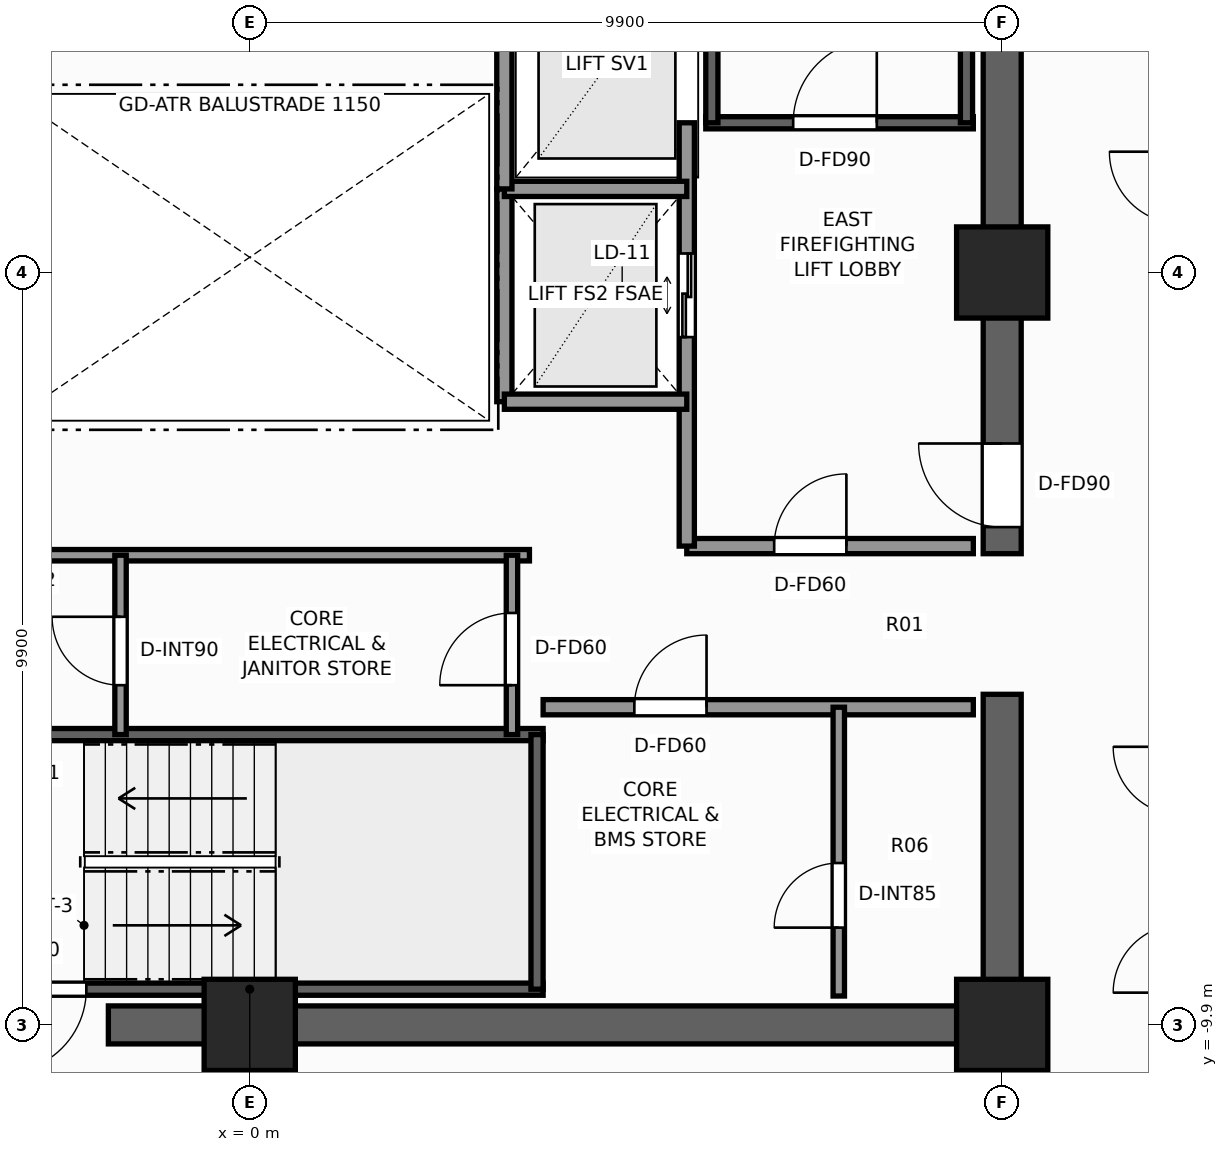
"""IFC4 building model, lengths in metres.
Left out: names, types, materials, properties, quantities, classifications, styles, units other than length and angle.
Written with IfcOpenShell. Run it as: python <this file> out.ifc"""

import sys

from ifc_helpers import new_model, si_unit, direction, frame, frame_2d, origin, origin_2d, place, context, subcontext, project, spatial, rectangle, extrude, element, fill, save


model = new_model("IFC4")
c1 = context("Model", 3, precision=1e-05, world=origin(), true_north=direction((0.0, 1.0)))
c2 = subcontext(c1, "Body", "Model", "MODEL_VIEW")
j1 = project(units=[si_unit("LENGTHUNIT", "METRE"), si_unit("PLANEANGLEUNIT", "RADIAN")], contexts=[c1])
p1 = place(None, origin())
s1 = spatial("IfcSite", under=j1, at=p1, CompositionType="ELEMENT")
p2 = place(p1, origin())
s2 = spatial("IfcBuilding", under=s1, at=p2, CompositionType="ELEMENT")
p3 = place(p2, frame((0.0, 0.0, 115.1)))
s3 = spatial("IfcBuildingStorey", under=s2, at=p3, CompositionType="ELEMENT", Elevation=115.1)
p4 = place(p3, frame((10.15, -9.9, 0.0), z_axis=(0.0, 0.0, 1.0), x_axis=(-1.0, 0.0, 0.0)))
e1 = element("IfcWall", 1, at=p4, inside=s3, PredefinedType="SHEAR", context=c2, shape_type="SweptSolid", body=[
    extrude(rectangle(XDim=12.01, YDim=0.5, at=frame_2d((6.005, 0.0))), origin(), (0.0, 0.0, 1.0), 3.3),
])
p5 = place(p3, frame((9.9, -9.65, 0.0), z_axis=(0.0, 0.0, 1.0), x_axis=(0.0, 1.0, 0.0)))
e2 = element("IfcWall", 2, at=p5, inside=s3, PredefinedType="SHEAR", context=c2, shape_type="SweptSolid", body=[
    extrude(rectangle(XDim=4.1, YDim=0.5, at=frame_2d((2.05, 0.0))), origin(), (0.0, 0.0, 1.0), 3.3),
])
p6 = place(p3, frame((9.9, -3.7, 0.0), z_axis=(0.0, 0.0, 1.0), x_axis=(0.0, 1.0, 0.0)))
e3 = element("IfcWall", 3, at=p6, inside=s3, PredefinedType="SHEAR", context=c2, shape_type="SweptSolid", body=[
    extrude(rectangle(XDim=13.35, YDim=0.5, at=frame_2d((6.675, 0.0))), origin(), (0.0, 0.0, 1.0), 3.3),
])
p7 = place(p6, frame((0.35, 0.0, 0.0)))
e4 = element("IfcOpeningElement", 4, at=p7, cuts=e3, PredefinedType="OPENING", context=c2, shape_type="SweptSolid", body=[
    extrude(rectangle(XDim=1.1, YDim=2.2, at=frame_2d((0.55, 1.1))), frame((0.0, 0.26, 0.0), z_axis=(0.0, -1.0, 0.0), x_axis=(1.0, 0.0, 0.0)), (0.0, 0.0, 1.0), 0.52),
])
for number, where, z_axis, x_axis in (
    (5, (9.9, -9.9, 0.0), (0.0, 0.0, 1.0), (1.0, 0.0, 0.0)),
    (6, (0.0, -9.9, 0.0), (0.0, 0.0, 1.0), (1.0, 0.0, 0.0)),
    (7, (9.9, 0.0, 0.0), (0.0, 0.0, 1.0), (1.0, 0.0, 0.0)),
):
    element("IfcColumn", number, at=place(p3, frame(where, z_axis=z_axis, x_axis=x_axis)), inside=s3, PredefinedType="COLUMN", context=c2, shape_type="SweptSolid", body=[
        extrude(rectangle(XDim=1.2, YDim=1.2, at=origin_2d()), origin(), (0.0, 0.0, 1.0), 3.3),
    ])
p8 = place(p3, frame((6.0, 1.97, 0.0), z_axis=(0.0, 0.0, 1.0), x_axis=(1.0, 0.0, 0.0)))
e8 = element("IfcWall", 8, at=p8, inside=s3, PredefinedType="SHEAR", context=c2, shape_type="SweptSolid", body=[
    extrude(rectangle(XDim=3.52, YDim=0.16, at=frame_2d((1.76, 0.0))), origin(), (0.0, 0.0, 1.0), 3.3),
])
p9 = place(p8, frame((1.15, 0.0, 0.0)))
e9 = element("IfcOpeningElement", 9, at=p9, cuts=e8, PredefinedType="OPENING", context=c2, shape_type="SweptSolid", body=[
    extrude(rectangle(XDim=1.1, YDim=2.2, at=frame_2d((0.55, 1.1))), frame((0.0, 0.09, 0.0), z_axis=(0.0, -1.0, 0.0), x_axis=(1.0, 0.0, 0.0)), (0.0, 0.0, 1.0), 0.18),
])
for number, where, z_axis, x_axis in (
    (10, (6.08, 1.97, 0.0), (0.0, 0.0, 1.0), (0.0, 1.0, 0.0)),
    (11, (9.43, 1.97, 0.0), (0.0, 0.0, 1.0), (0.0, 1.0, 0.0)),
):
    element("IfcWall", number, at=place(p3, frame(where, z_axis=z_axis, x_axis=x_axis)), inside=s3, PredefinedType="SHEAR", context=c2, shape_type="SweptSolid", body=[
        extrude(rectangle(XDim=7.56, YDim=0.16, at=frame_2d((3.78, 0.0))), origin(), (0.0, 0.0, 1.0), 3.3),
    ])
p10 = place(p3, frame((3.86, -9.43, 0.0), z_axis=(0.0, 0.0, 1.0), x_axis=(-1.0, 0.0, 0.0)))
e12 = element("IfcWall", 12, at=p10, inside=s3, PredefinedType="SHEAR", context=c2, shape_type="SweptSolid", body=[
    extrude(rectangle(XDim=7.72, YDim=0.16, at=frame_2d((3.86, 0.0))), origin(), (0.0, 0.0, 1.0), 3.3),
])
p11 = place(p10, frame((6.01, 0.0, 0.0)))
e13 = element("IfcOpeningElement", 13, at=p11, cuts=e12, PredefinedType="OPENING", context=c2, shape_type="SweptSolid", body=[
    extrude(rectangle(XDim=1.1, YDim=2.2, at=frame_2d((0.55, 1.1))), frame((0.0, 0.09, 0.0), z_axis=(0.0, -1.0, 0.0), x_axis=(1.0, 0.0, 0.0)), (0.0, 0.0, 1.0), 0.18),
])
p12 = place(p3, frame((-3.86, -6.08, 0.0), z_axis=(0.0, 0.0, 1.0), x_axis=(1.0, 0.0, 0.0)))
e14 = element("IfcWall", 14, at=p12, inside=s3, PredefinedType="SHEAR", context=c2, shape_type="SweptSolid", body=[
    extrude(rectangle(XDim=7.72, YDim=0.16, at=frame_2d((3.86, 0.0))), origin(), (0.0, 0.0, 1.0), 3.3),
])
p13 = place(p3, frame((3.78, -9.43, 0.0), z_axis=(0.0, 0.0, 1.0), x_axis=(0.0, 1.0, 0.0)))
e15 = element("IfcWall", 15, at=p13, inside=s3, PredefinedType="SHEAR", context=c2, shape_type="SweptSolid", body=[
    extrude(rectangle(XDim=3.35, YDim=0.16, at=frame_2d((1.675, 0.0))), origin(), (0.0, 0.0, 1.0), 3.3),
])
p14 = place(p3, frame((5.75, -3.6, 0.0), z_axis=(0.0, 0.0, 1.0), x_axis=(1.0, 0.0, 0.0)))
e16 = element("IfcWall", 16, at=p14, inside=s3, PredefinedType="SOLIDWALL", context=c2, shape_type="SweptSolid", body=[
    extrude(rectangle(XDim=3.77, YDim=0.2, at=frame_2d((1.885, 0.0))), origin(), (0.0, 0.0, 1.0), 3.08),
])
p15 = place(p14, frame((1.15, 0.0, 0.0)))
e17 = element("IfcOpeningElement", 17, at=p15, cuts=e16, PredefinedType="OPENING", context=c2, shape_type="SweptSolid", body=[
    extrude(rectangle(XDim=0.95, YDim=2.06, at=frame_2d((0.475, 1.03))), frame((0.0, 0.11, 0.0), z_axis=(0.0, -1.0, 0.0), x_axis=(1.0, 0.0, 0.0)), (0.0, 0.0, 1.0), 0.22),
])
p16 = place(p3, frame((5.75, -3.6, 0.0), z_axis=(0.0, 0.0, 1.0), x_axis=(0.0, 1.0, 0.0)))
e18 = element("IfcWall", 18, at=p16, inside=s3, PredefinedType="SOLIDWALL", context=c2, shape_type="SweptSolid", body=[
    extrude(rectangle(XDim=5.57, YDim=0.2, at=frame_2d((2.785, 0.0))), origin(), (0.0, 0.0, 1.0), 2.715),
])
p17 = place(p16, frame((2.75, 0.0, 0.0)))
e19 = element("IfcOpeningElement", 19, at=p17, cuts=e18, PredefinedType="OPENING", context=c2, shape_type="SweptSolid", body=[
    extrude(rectangle(XDim=1.1, YDim=2.2, at=frame_2d((0.55, 1.1))), frame((0.0, 0.11, 0.0), z_axis=(0.0, -1.0, 0.0), x_axis=(1.0, 0.0, 0.0)), (0.0, 0.0, 1.0), 0.22),
])
p18 = place(p3, frame((3.35, -1.7, 0.0), z_axis=(0.0, 0.0, 1.0), x_axis=(0.0, 1.0, 0.0)))
e20 = element("IfcWall", 20, at=p18, inside=s3, PredefinedType="SOLIDWALL", context=c2, shape_type="SweptSolid", body=[
    extrude(rectangle(XDim=2.8, YDim=0.2, at=frame_2d((1.4, 0.0))), origin(), (0.0, 0.0, 1.0), 2.715),
])
for number, where, z_axis, x_axis in (
    (21, (3.35, -1.7, 0.0), (0.0, 0.0, 1.0), (1.0, 0.0, 0.0)),
    (22, (3.35, 1.1, 0.0), (0.0, 0.0, 1.0), (1.0, 0.0, 0.0)),
):
    element("IfcWall", number, at=place(p3, frame(where, z_axis=z_axis, x_axis=x_axis)), inside=s3, PredefinedType="SOLIDWALL", context=c2, shape_type="SweptSolid", body=[
        extrude(rectangle(XDim=2.4, YDim=0.2, at=frame_2d((1.2, 0.0))), origin(), (0.0, 0.0, 1.0), 3.08),
    ])
p19 = place(p3, frame((3.35, 1.1, 0.0), z_axis=(0.0, 0.0, 1.0), x_axis=(0.0, 1.0, 0.0)))
e23 = element("IfcWall", 23, at=p19, inside=s3, PredefinedType="SOLIDWALL", context=c2, shape_type="SweptSolid", body=[
    extrude(rectangle(XDim=3.2, YDim=0.2, at=frame_2d((1.6, 0.0))), origin(), (0.0, 0.0, 1.0), 2.715),
])
p20 = place(p3, frame((3.86, -5.72, 0.0), z_axis=(0.0, 0.0, 1.0), x_axis=(1.0, 0.0, 0.0)))
e24 = element("IfcWall", 24, at=p20, inside=s3, PredefinedType="SOLIDWALL", context=c2, shape_type="SweptSolid", body=[
    extrude(rectangle(XDim=5.66, YDim=0.2, at=frame_2d((2.83, 0.0))), origin(), (0.0, 0.0, 1.0), 3.08),
])
p21 = place(p20, frame((1.2, 0.0, 0.0)))
e25 = element("IfcOpeningElement", 25, at=p21, cuts=e24, PredefinedType="OPENING", context=c2, shape_type="SweptSolid", body=[
    extrude(rectangle(XDim=0.95, YDim=2.06, at=frame_2d((0.475, 1.03))), frame((0.0, 0.11, 0.0), z_axis=(0.0, -1.0, 0.0), x_axis=(1.0, 0.0, 0.0)), (0.0, 0.0, 1.0), 0.22),
])
p22 = place(p3, frame((7.75, -9.52, 0.0), z_axis=(0.0, 0.0, 1.0), x_axis=(0.0, 1.0, 0.0)))
e26 = element("IfcWall", 26, at=p22, inside=s3, PredefinedType="PARTITIONING", context=c2, shape_type="SweptSolid", body=[
    extrude(rectangle(XDim=3.8, YDim=0.15, at=frame_2d((1.9, 0.0))), origin(), (0.0, 0.0, 1.0), 3.08),
])
p23 = place(p22, frame((0.9, 0.0, 0.0)))
e27 = element("IfcOpeningElement", 27, at=p23, cuts=e26, PredefinedType="OPENING", context=c2, shape_type="SweptSolid", body=[
    extrude(rectangle(XDim=0.85, YDim=2.03, at=frame_2d((0.425, 1.015))), frame((0.0, 0.085, 0.0), z_axis=(0.0, -1.0, 0.0), x_axis=(1.0, 0.0, 0.0)), (0.0, 0.0, 1.0), 0.17),
])
p24 = place(p3, frame((-3.68, -3.72, 0.0), z_axis=(0.0, 0.0, 1.0), x_axis=(1.0, 0.0, 0.0)))
e28 = element("IfcWall", 28, at=p24, inside=s3, PredefinedType="PARTITIONING", context=c2, shape_type="SweptSolid", body=[
    extrude(rectangle(XDim=7.36, YDim=0.15, at=frame_2d((3.68, 0.0))), origin(), (0.0, 0.0, 1.0), 3.08),
])
p25 = place(p3, frame((3.45, -6.08, 0.0), z_axis=(0.0, 0.0, 1.0), x_axis=(0.0, 1.0, 0.0)))
e29 = element("IfcWall", 29, at=p25, inside=s3, PredefinedType="PARTITIONING", context=c2, shape_type="SweptSolid", body=[
    extrude(rectangle(XDim=2.36, YDim=0.15, at=frame_2d((1.18, 0.0))), origin(), (0.0, 0.0, 1.0), 3.08),
])
p26 = place(p25, frame((0.65, 0.0, 0.0)))
e30 = element("IfcOpeningElement", 30, at=p26, cuts=e29, PredefinedType="OPENING", context=c2, shape_type="SweptSolid", body=[
    extrude(rectangle(XDim=0.95, YDim=2.06, at=frame_2d((0.475, 1.03))), frame((0.0, 0.085, 0.0), z_axis=(0.0, -1.0, 0.0), x_axis=(1.0, 0.0, 0.0)), (0.0, 0.0, 1.0), 0.17),
])
p27 = place(p3, frame((-1.7, -6.08, 0.0), z_axis=(0.0, 0.0, 1.0), x_axis=(0.0, 1.0, 0.0)))
e31 = element("IfcWall", 31, at=p27, inside=s3, PredefinedType="PARTITIONING", context=c2, shape_type="SweptSolid", body=[
    extrude(rectangle(XDim=2.36, YDim=0.15, at=frame_2d((1.18, 0.0))), origin(), (0.0, 0.0, 1.0), 3.08),
])
p28 = place(p27, frame((0.65, 0.0, 0.0)))
e32 = element("IfcOpeningElement", 32, at=p28, cuts=e31, PredefinedType="OPENING", context=c2, shape_type="SweptSolid", body=[
    extrude(rectangle(XDim=0.9, YDim=2.06, at=frame_2d((0.45, 1.03))), frame((0.0, 0.085, 0.0), z_axis=(0.0, -1.0, 0.0), x_axis=(1.0, 0.0, 0.0)), (0.0, 0.0, 1.0), 0.17),
])
p29 = place(p9, origin())
e33 = element("IfcDoor", 33, at=p29, inside=s3, OperationType="SINGLE_SWING_RIGHT", PredefinedType="DOOR", context=c2, shape_type="SweptSolid", body=[
    extrude(rectangle(XDim=1.1, YDim=2.2, at=frame_2d((0.55, 1.1))), frame((0.0, 0.025, 0.0), z_axis=(0.0, -1.0, 0.0), x_axis=(1.0, 0.0, 0.0)), (0.0, 0.0, 1.0), 0.05),
])
fill(e9, e33)
p30 = place(p11, origin())
e34 = element("IfcDoor", 34, at=p30, inside=s3, OperationType="SINGLE_SWING_RIGHT", PredefinedType="DOOR", context=c2, shape_type="SweptSolid", body=[
    extrude(rectangle(XDim=1.1, YDim=2.2, at=frame_2d((0.55, 1.1))), frame((0.0, 0.025, 0.0), z_axis=(0.0, -1.0, 0.0), x_axis=(1.0, 0.0, 0.0)), (0.0, 0.0, 1.0), 0.05),
])
fill(e13, e34)
p31 = place(p7, origin())
e35 = element("IfcDoor", 35, at=p31, inside=s3, OperationType="SINGLE_SWING_RIGHT", PredefinedType="DOOR", context=c2, shape_type="SweptSolid", body=[
    extrude(rectangle(XDim=1.1, YDim=2.2, at=frame_2d((0.55, 1.1))), frame((0.0, 0.025, 0.0), z_axis=(0.0, -1.0, 0.0), x_axis=(1.0, 0.0, 0.0)), (0.0, 0.0, 1.0), 0.05),
])
fill(e4, e35)
p32 = place(p17, origin())
e36 = element("IfcDoor", 36, at=p32, inside=s3, OperationType="DOUBLE_DOOR_SLIDING", PredefinedType="DOOR", context=c2, shape_type="SweptSolid", body=[
    extrude(rectangle(XDim=1.1, YDim=2.2, at=frame_2d((0.55, 1.1))), frame((0.0, 0.025, 0.0), z_axis=(0.0, -1.0, 0.0), x_axis=(1.0, 0.0, 0.0)), (0.0, 0.0, 1.0), 0.05),
])
fill(e19, e36)
p33 = place(p21, origin())
e37 = element("IfcDoor", 37, at=p33, inside=s3, OperationType="SINGLE_SWING_RIGHT", PredefinedType="DOOR", context=c2, shape_type="SweptSolid", body=[
    extrude(rectangle(XDim=0.95, YDim=2.06, at=frame_2d((0.475, 1.03))), frame((0.0, 0.025, 0.0), z_axis=(0.0, -1.0, 0.0), x_axis=(1.0, 0.0, 0.0)), (0.0, 0.0, 1.0), 0.05),
])
fill(e25, e37)
p34 = place(p23, origin())
e38 = element("IfcDoor", 38, at=p34, inside=s3, OperationType="SINGLE_SWING_LEFT", PredefinedType="DOOR", context=c2, shape_type="SweptSolid", body=[
    extrude(rectangle(XDim=0.85, YDim=2.03, at=frame_2d((0.425, 1.015))), frame((0.0, 0.025, 0.0), z_axis=(0.0, -1.0, 0.0), x_axis=(1.0, 0.0, 0.0)), (0.0, 0.0, 1.0), 0.05),
])
fill(e27, e38)
p35 = place(p15, origin())
e39 = element("IfcDoor", 39, at=p35, inside=s3, OperationType="SINGLE_SWING_RIGHT", PredefinedType="DOOR", context=c2, shape_type="SweptSolid", body=[
    extrude(rectangle(XDim=0.95, YDim=2.06, at=frame_2d((0.475, 1.03))), frame((0.0, 0.025, 0.0), z_axis=(0.0, -1.0, 0.0), x_axis=(1.0, 0.0, 0.0)), (0.0, 0.0, 1.0), 0.05),
])
fill(e17, e39)
p36 = place(p26, origin())
e40 = element("IfcDoor", 40, at=p36, inside=s3, OperationType="SINGLE_SWING_LEFT", PredefinedType="DOOR", context=c2, shape_type="SweptSolid", body=[
    extrude(rectangle(XDim=0.95, YDim=2.06, at=frame_2d((0.475, 1.03))), frame((0.0, 0.025, 0.0), z_axis=(0.0, -1.0, 0.0), x_axis=(1.0, 0.0, 0.0)), (0.0, 0.0, 1.0), 0.05),
])
fill(e30, e40)
p37 = place(p28, origin())
e41 = element("IfcDoor", 41, at=p37, inside=s3, OperationType="SINGLE_SWING_RIGHT", PredefinedType="DOOR", context=c2, shape_type="SweptSolid", body=[
    extrude(rectangle(XDim=0.9, YDim=2.06, at=frame_2d((0.45, 1.03))), frame((0.0, 0.025, 0.0), z_axis=(0.0, -1.0, 0.0), x_axis=(1.0, 0.0, 0.0)), (0.0, 0.0, 1.0), 0.05),
])
fill(e32, e41)
save(model, sys.argv[1])
